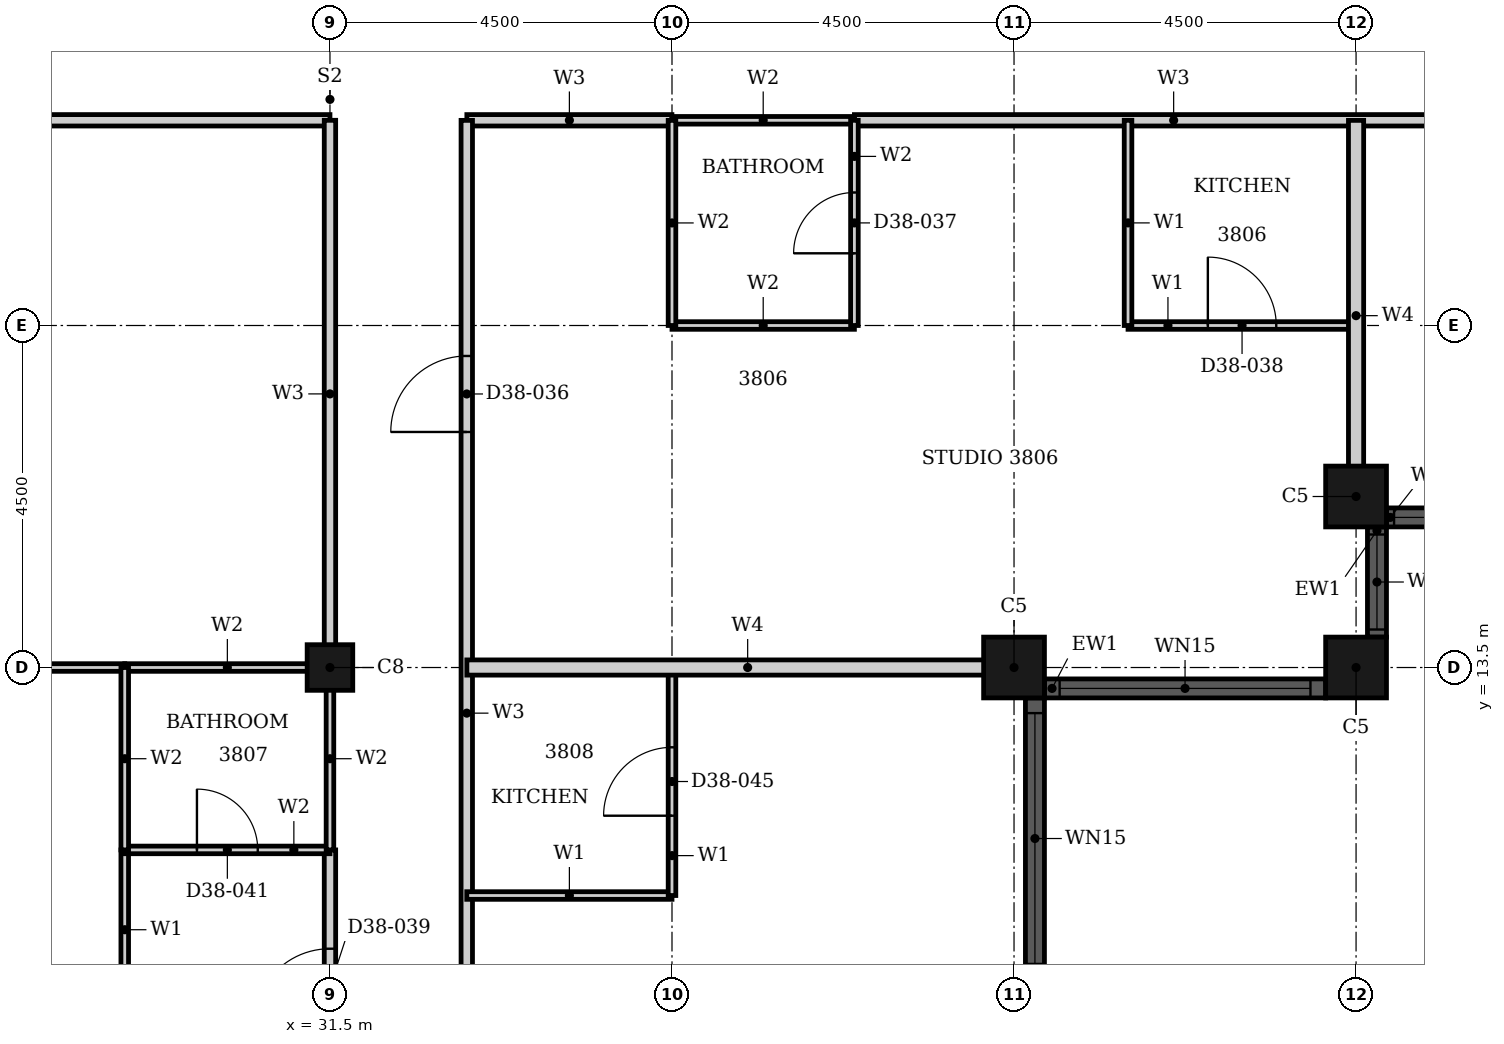
"""IFC4 building model, lengths in metres.
Left out: names, types, materials, properties, quantities, classifications, styles, units other than length and angle.
Written with IfcOpenShell. Run it as: python <this file> out.ifc"""

import sys

from ifc_helpers import new_model, si_unit, direction, frame, frame_2d, origin, origin_2d, place, context, subcontext, project, spatial, rectangle, hollow_rectangle, extrude, element, fill, save


model = new_model("IFC4")
c1 = context("Model", 3, precision=1e-05, world=origin(), true_north=direction((0.0, 1.0)))
c2 = subcontext(c1, "Body", "Model", "MODEL_VIEW")
j1 = project(units=[si_unit("LENGTHUNIT", "METRE"), si_unit("PLANEANGLEUNIT", "RADIAN")], contexts=[c1])
p1 = place(None, origin())
s1 = spatial("IfcSite", under=j1, at=p1, CompositionType="ELEMENT")
p2 = place(p1, origin())
s2 = spatial("IfcBuilding", under=s1, at=p2, CompositionType="ELEMENT")
p3 = place(p2, frame((0.0, 0.0, 154.3)))
s3 = spatial("IfcBuildingStorey", under=s2, at=p3, CompositionType="ELEMENT", Elevation=154.3)
for number, where, z_axis, x_axis in (
    (1, (40.5, 13.5, 0.0), (0.0, 0.0, 1.0), (1.0, 0.0, 0.0)),
    (2, (45.0, 13.5, 0.0), (0.0, 0.0, 1.0), (1.0, 0.0, 0.0)),
    (3, (45.0, 15.75, 0.0), (0.0, 0.0, 1.0), (1.0, 0.0, 0.0)),
):
    element("IfcColumn", number, at=place(p3, frame(where, z_axis=z_axis, x_axis=x_axis)), inside=s3, PredefinedType="COLUMN", context=c2, shape_type="SweptSolid", body=[
        extrude(hollow_rectangle(XDim=0.8, YDim=0.8, WallThickness=0.025, at=origin_2d()), origin(), (0.0, 0.0, 1.0), 3.7),
    ])
p4 = place(p3, frame((31.5, 13.5, 0.0), z_axis=(0.0, 0.0, 1.0), x_axis=(1.0, 0.0, 0.0)))
e4 = element("IfcColumn", 4, at=p4, inside=s3, PredefinedType="COLUMN", context=c2, shape_type="SweptSolid", body=[
    extrude(hollow_rectangle(XDim=0.6, YDim=0.6, WallThickness=0.02, at=origin_2d()), origin(), (0.0, 0.0, 1.0), 3.7),
])
p5 = place(p3, frame((40.775, 4.9, 0.0), z_axis=(0.0, 0.0, 1.0), x_axis=(0.0, 1.0, 0.0)))
e5 = element("IfcWall", 5, at=p5, inside=s3, PredefinedType="SOLIDWALL", context=c2, shape_type="SweptSolid", body=[
    extrude(rectangle(XDim=8.2, YDim=0.25, at=frame_2d((4.1, 0.0))), origin(), (0.0, 0.0, 1.0), 3.7),
])
p6 = place(p5, frame((0.2, 0.0, 0.45)))
e6 = element("IfcOpeningElement", 6, at=p6, cuts=e5, PredefinedType="OPENING", context=c2, shape_type="SweptSolid", body=[
    extrude(rectangle(XDim=3.3, YDim=2.3, at=frame_2d((1.65, 1.15))), frame((0.0, 0.135, 0.0), z_axis=(0.0, -1.0, 0.0), x_axis=(1.0, 0.0, 0.0)), (0.0, 0.0, 1.0), 0.27),
])
p7 = place(p5, frame((4.7, 0.0, 0.45)))
e7 = element("IfcOpeningElement", 7, at=p7, cuts=e5, PredefinedType="OPENING", context=c2, shape_type="SweptSolid", body=[
    extrude(rectangle(XDim=3.3, YDim=2.3, at=frame_2d((1.65, 1.15))), frame((0.0, 0.135, 0.0), z_axis=(0.0, -1.0, 0.0), x_axis=(1.0, 0.0, 0.0)), (0.0, 0.0, 1.0), 0.27),
])
p8 = place(p3, frame((40.9, 13.225, 0.0), z_axis=(0.0, 0.0, 1.0), x_axis=(1.0, 0.0, 0.0)))
e8 = element("IfcWall", 8, at=p8, inside=s3, PredefinedType="SOLIDWALL", context=c2, shape_type="SweptSolid", body=[
    extrude(rectangle(XDim=3.7, YDim=0.25, at=frame_2d((1.85, 0.0))), origin(), (0.0, 0.0, 1.0), 3.7),
])
p9 = place(p8, frame((0.2, 0.0, 0.45)))
e9 = element("IfcOpeningElement", 9, at=p9, cuts=e8, PredefinedType="OPENING", context=c2, shape_type="SweptSolid", body=[
    extrude(rectangle(XDim=3.3, YDim=2.3, at=frame_2d((1.65, 1.15))), frame((0.0, 0.135, 0.0), z_axis=(0.0, -1.0, 0.0), x_axis=(1.0, 0.0, 0.0)), (0.0, 0.0, 1.0), 0.27),
])
p10 = place(p3, frame((45.275, 13.9, 0.0), z_axis=(0.0, 0.0, 1.0), x_axis=(0.0, 1.0, 0.0)))
e10 = element("IfcWall", 10, at=p10, inside=s3, PredefinedType="SOLIDWALL", context=c2, shape_type="SweptSolid", body=[
    extrude(rectangle(XDim=1.45, YDim=0.25, at=frame_2d((0.725, 0.0))), origin(), (0.0, 0.0, 1.0), 3.7),
])
p11 = place(p10, frame((0.1, 0.0, 0.9)))
e11 = element("IfcOpeningElement", 11, at=p11, cuts=e10, PredefinedType="OPENING", context=c2, shape_type="SweptSolid", body=[
    extrude(rectangle(XDim=1.25, YDim=1.85, at=frame_2d((0.625, 0.925))), frame((0.0, 0.135, 0.0), z_axis=(0.0, -1.0, 0.0), x_axis=(1.0, 0.0, 0.0)), (0.0, 0.0, 1.0), 0.27),
])
p12 = place(p3, frame((45.4, 15.475, 0.0), z_axis=(0.0, 0.0, 1.0), x_axis=(1.0, 0.0, 0.0)))
e12 = element("IfcWall", 12, at=p12, inside=s3, PredefinedType="SOLIDWALL", context=c2, shape_type="SweptSolid", body=[
    extrude(rectangle(XDim=1.45, YDim=0.25, at=frame_2d((0.725, 0.0))), origin(), (0.0, 0.0, 1.0), 3.7),
])
p13 = place(p12, frame((0.1, 0.0, 0.9)))
e13 = element("IfcOpeningElement", 13, at=p13, cuts=e12, PredefinedType="OPENING", context=c2, shape_type="SweptSolid", body=[
    extrude(rectangle(XDim=1.25, YDim=1.85, at=frame_2d((0.625, 0.925))), frame((0.0, 0.135, 0.0), z_axis=(0.0, -1.0, 0.0), x_axis=(1.0, 0.0, 0.0)), (0.0, 0.0, 1.0), 0.27),
])
p14 = place(p3, frame((33.301, 20.7, 0.0), z_axis=(0.0, 0.0, 1.0), x_axis=(1.0, 0.0, 0.0)))
e14 = element("IfcWall", 14, at=p14, inside=s3, PredefinedType="PARTITIONING", context=c2, shape_type="SweptSolid", body=[
    extrude(rectangle(XDim=2.698, YDim=0.15, at=frame_2d((1.349, 0.0))), origin(), (0.0, 0.0, 1.0), 3.4),
])
p15 = place(p3, frame((38.4, 20.7, 0.0), z_axis=(0.0, 0.0, 1.0), x_axis=(1.0, 0.0, 0.0)))
e15 = element("IfcWall", 15, at=p15, inside=s3, PredefinedType="PARTITIONING", context=c2, shape_type="SweptSolid", body=[
    extrude(rectangle(XDim=8.4, YDim=0.15, at=frame_2d((4.2, 0.0))), origin(), (0.0, 0.0, 1.0), 3.4),
])
p16 = place(p3, frame((18.0, 20.7, 0.0), z_axis=(0.0, 0.0, 1.0), x_axis=(1.0, 0.0, 0.0)))
e16 = element("IfcWall", 16, at=p16, inside=s3, PredefinedType="PARTITIONING", context=c2, shape_type="SweptSolid", body=[
    extrude(rectangle(XDim=13.5, YDim=0.15, at=frame_2d((6.75, 0.0))), origin(), (0.0, 0.0, 1.0), 3.4),
])
p17 = place(p16, frame((6.25, 0.0, 0.0)))
e17 = element("IfcOpeningElement", 17, at=p17, cuts=e16, PredefinedType="OPENING", context=c2, shape_type="SweptSolid", body=[
    extrude(rectangle(XDim=1.0, YDim=2.1, at=frame_2d((0.5, 1.05))), frame((0.0, 0.085, 0.0), z_axis=(0.0, -1.0, 0.0), x_axis=(1.0, 0.0, 0.0)), (0.0, 0.0, 1.0), 0.17),
])
p18 = place(p3, frame((31.5, 4.5, 0.0), z_axis=(0.0, 0.0, 1.0), x_axis=(0.0, 1.0, 0.0)))
e18 = element("IfcWall", 18, at=p18, inside=s3, PredefinedType="PARTITIONING", context=c2, shape_type="SweptSolid", body=[
    extrude(rectangle(XDim=6.6, YDim=0.15, at=frame_2d((3.3, 0.0))), origin(), (0.0, 0.0, 1.0), 2.68),
])
p19 = place(p18, frame((4.3, 0.0, 0.0)))
e19 = element("IfcOpeningElement", 19, at=p19, cuts=e18, PredefinedType="OPENING", context=c2, shape_type="SweptSolid", body=[
    extrude(rectangle(XDim=1.0, YDim=2.2, at=frame_2d((0.5, 1.1))), frame((0.0, 0.085, 0.0), z_axis=(0.0, -1.0, 0.0), x_axis=(1.0, 0.0, 0.0)), (0.0, 0.0, 1.0), 0.17),
])
p20 = place(p3, frame((31.5, 13.5, 0.0), z_axis=(0.0, 0.0, 1.0), x_axis=(0.0, 1.0, 0.0)))
e20 = element("IfcWall", 20, at=p20, inside=s3, PredefinedType="PARTITIONING", context=c2, shape_type="SweptSolid", body=[
    extrude(rectangle(XDim=7.2, YDim=0.15, at=frame_2d((3.6, 0.0))), origin(), (0.0, 0.0, 1.0), 3.4),
])
p21 = place(p3, frame((33.3, 6.9, 0.0), z_axis=(0.0, 0.0, 1.0), x_axis=(0.0, 1.0, 0.0)))
e21 = element("IfcWall", 21, at=p21, inside=s3, PredefinedType="PARTITIONING", context=c2, shape_type="SweptSolid", body=[
    extrude(rectangle(XDim=13.799, YDim=0.15, at=frame_2d((6.899, 0.0))), origin(), (0.0, 0.0, 1.0), 3.4),
])
p22 = place(p21, frame((9.699, 0.0, 0.0)))
e22 = element("IfcOpeningElement", 22, at=p22, cuts=e21, PredefinedType="OPENING", context=c2, shape_type="SweptSolid", body=[
    extrude(rectangle(XDim=1.0, YDim=2.2, at=frame_2d((0.5, 1.1))), frame((0.0, 0.085, 0.0), z_axis=(0.0, -1.0, 0.0), x_axis=(1.0, 0.0, 0.0)), (0.0, 0.0, 1.0), 0.17),
])
p23 = place(p21, frame((1.3, 0.0, 0.0)))
e23 = element("IfcOpeningElement", 23, at=p23, cuts=e21, PredefinedType="OPENING", context=c2, shape_type="SweptSolid", body=[
    extrude(rectangle(XDim=1.0, YDim=2.2, at=frame_2d((0.5, 1.1))), frame((0.0, 0.085, 0.0), z_axis=(0.0, -1.0, 0.0), x_axis=(1.0, 0.0, 0.0)), (0.0, 0.0, 1.0), 0.17),
])
p24 = place(p3, frame((33.3, 10.5, 0.0), z_axis=(0.0, 0.0, 1.0), x_axis=(1.0, 0.0, 0.0)))
e24 = element("IfcWall", 24, at=p24, inside=s3, PredefinedType="PARTITIONING", context=c2, shape_type="SweptSolid", body=[
    extrude(rectangle(XDim=2.7, YDim=0.1, at=frame_2d((1.35, 0.0))), origin(), (0.0, 0.0, 1.0), 3.4),
])
p25 = place(p3, frame((22.31, 13.5, 0.0), z_axis=(0.0, 0.0, 1.0), x_axis=(1.0, 0.0, 0.0)))
e25 = element("IfcWall", 25, at=p25, inside=s3, PredefinedType="PARTITIONING", context=c2, shape_type="SweptSolid", body=[
    extrude(rectangle(XDim=6.49, YDim=0.1, at=frame_2d((3.245, 0.0))), origin(), (0.0, 0.0, 1.0), 2.48),
])
p26 = place(p3, frame((42.0, 18.0, 0.0), z_axis=(0.0, 0.0, 1.0), x_axis=(1.0, 0.0, 0.0)))
e26 = element("IfcWall", 26, at=p26, inside=s3, PredefinedType="PARTITIONING", context=c2, shape_type="SweptSolid", body=[
    extrude(rectangle(XDim=3.0, YDim=0.1, at=frame_2d((1.5, 0.0))), origin(), (0.0, 0.0, 1.0), 3.4),
])
p27 = place(p26, frame((1.05, 0.0, 0.0)))
e27 = element("IfcOpeningElement", 27, at=p27, cuts=e26, PredefinedType="OPENING", context=c2, shape_type="SweptSolid", body=[
    extrude(rectangle(XDim=0.9, YDim=2.1, at=frame_2d((0.45, 1.05))), frame((0.0, 0.06, 0.0), z_axis=(0.0, -1.0, 0.0), x_axis=(1.0, 0.0, 0.0)), (0.0, 0.0, 1.0), 0.12),
])
p28 = place(p3, frame((28.8, 9.0, 0.0), z_axis=(0.0, 0.0, 1.0), x_axis=(0.0, 1.0, 0.0)))
e28 = element("IfcWall", 28, at=p28, inside=s3, PredefinedType="PARTITIONING", context=c2, shape_type="SweptSolid", body=[
    extrude(rectangle(XDim=2.1, YDim=0.1, at=frame_2d((1.05, 0.0))), origin(), (0.0, 0.0, 1.0), 3.4),
])
p29 = place(p3, frame((36.0, 10.5, 0.0), z_axis=(0.0, 0.0, 1.0), x_axis=(0.0, 1.0, 0.0)))
e29 = element("IfcWall", 29, at=p29, inside=s3, PredefinedType="PARTITIONING", context=c2, shape_type="SweptSolid", body=[
    extrude(rectangle(XDim=3.0, YDim=0.1, at=frame_2d((1.5, 0.0))), origin(), (0.0, 0.0, 1.0), 2.68),
])
p30 = place(p29, frame((1.05, 0.0, 0.0)))
e30 = element("IfcOpeningElement", 30, at=p30, cuts=e29, PredefinedType="OPENING", context=c2, shape_type="SweptSolid", body=[
    extrude(rectangle(XDim=0.9, YDim=2.1, at=frame_2d((0.45, 1.05))), frame((0.0, 0.06, 0.0), z_axis=(0.0, -1.0, 0.0), x_axis=(1.0, 0.0, 0.0)), (0.0, 0.0, 1.0), 0.12),
])
p31 = place(p3, frame((42.0, 18.0, 0.0), z_axis=(0.0, 0.0, 1.0), x_axis=(0.0, 1.0, 0.0)))
e31 = element("IfcWall", 31, at=p31, inside=s3, PredefinedType="PARTITIONING", context=c2, shape_type="SweptSolid", body=[
    extrude(rectangle(XDim=2.7, YDim=0.1, at=frame_2d((1.35, 0.0))), origin(), (0.0, 0.0, 1.0), 3.4),
])
p32 = place(p3, frame((33.301, 13.5, 0.0), z_axis=(0.0, 0.0, 1.0), x_axis=(1.0, 0.0, 0.0)))
e32 = element("IfcWall", 32, at=p32, inside=s3, PredefinedType="PARTITIONING", context=c2, shape_type="SweptSolid", body=[
    extrude(rectangle(XDim=7.389, YDim=0.2, at=frame_2d((3.694, 0.0))), origin(), (0.0, 0.0, 1.0), 2.48),
])
p33 = place(p3, frame((45.0, 15.56, 0.0), z_axis=(0.0, 0.0, 1.0), x_axis=(0.0, 1.0, 0.0)))
e33 = element("IfcWall", 33, at=p33, inside=s3, PredefinedType="PARTITIONING", context=c2, shape_type="SweptSolid", body=[
    extrude(rectangle(XDim=5.139, YDim=0.2, at=frame_2d((2.569, 0.0))), origin(), (0.0, 0.0, 1.0), 3.4),
])
p34 = place(p3, frame((28.8, 11.1, 0.0), z_axis=(0.0, 0.0, 1.0), x_axis=(1.0, 0.0, 0.0)))
e34 = element("IfcWall", 34, at=p34, inside=s3, PredefinedType="PARTITIONING", context=c2, shape_type="SweptSolid", body=[
    extrude(rectangle(XDim=2.7, YDim=0.1, at=frame_2d((1.35, 0.0))), origin(), (0.0, 0.0, 1.0), 3.4),
])
p35 = place(p34, frame((0.95, 0.0, 0.0)))
e35 = element("IfcOpeningElement", 35, at=p35, cuts=e34, PredefinedType="OPENING", context=c2, shape_type="SweptSolid", body=[
    extrude(rectangle(XDim=0.8, YDim=2.1, at=frame_2d((0.4, 1.05))), frame((0.0, 0.06, 0.0), z_axis=(0.0, -1.0, 0.0), x_axis=(1.0, 0.0, 0.0)), (0.0, 0.0, 1.0), 0.12),
])
p36 = place(p3, frame((28.8, 13.5, 0.0), z_axis=(0.0, 0.0, 1.0), x_axis=(1.0, 0.0, 0.0)))
e36 = element("IfcWall", 36, at=p36, inside=s3, PredefinedType="PARTITIONING", context=c2, shape_type="SweptSolid", body=[
    extrude(rectangle(XDim=2.7, YDim=0.1, at=frame_2d((1.35, 0.0))), origin(), (0.0, 0.0, 1.0), 2.48),
])
for number, where, z_axis, x_axis in (
    (37, (36.0, 18.0, 0.0), (0.0, 0.0, 1.0), (1.0, 0.0, 0.0)),
    (38, (36.0, 20.7, 0.0), (0.0, 0.0, 1.0), (1.0, 0.0, 0.0)),
    (39, (28.8, 11.1, 0.0), (0.0, 0.0, 1.0), (0.0, 1.0, 0.0)),
):
    element("IfcWall", number, at=place(p3, frame(where, z_axis=z_axis, x_axis=x_axis)), inside=s3, PredefinedType="PARTITIONING", context=c2, shape_type="SweptSolid", body=[
        extrude(rectangle(XDim=2.4, YDim=0.1, at=frame_2d((1.2, 0.0))), origin(), (0.0, 0.0, 1.0), 3.4),
    ])
p37 = place(p3, frame((31.5, 11.1, 0.0), z_axis=(0.0, 0.0, 1.0), x_axis=(0.0, 1.0, 0.0)))
e40 = element("IfcWall", 40, at=p37, inside=s3, PredefinedType="PARTITIONING", context=c2, shape_type="SweptSolid", body=[
    extrude(rectangle(XDim=2.4, YDim=0.1, at=frame_2d((1.2, 0.0))), origin(), (0.0, 0.0, 1.0), 2.68),
])
p38 = place(p3, frame((36.0, 18.0, 0.0), z_axis=(0.0, 0.0, 1.0), x_axis=(0.0, 1.0, 0.0)))
e41 = element("IfcWall", 41, at=p38, inside=s3, PredefinedType="PARTITIONING", context=c2, shape_type="SweptSolid", body=[
    extrude(rectangle(XDim=2.699, YDim=0.1, at=frame_2d((1.35, 0.0))), origin(), (0.0, 0.0, 1.0), 3.4),
])
p39 = place(p3, frame((38.4, 18.0, 0.0), z_axis=(0.0, 0.0, 1.0), x_axis=(0.0, 1.0, 0.0)))
e42 = element("IfcWall", 42, at=p39, inside=s3, PredefinedType="PARTITIONING", context=c2, shape_type="SweptSolid", body=[
    extrude(rectangle(XDim=2.7, YDim=0.1, at=frame_2d((1.35, 0.0))), origin(), (0.0, 0.0, 1.0), 3.4),
])
p40 = place(p39, frame((0.95, 0.0, 0.0)))
e43 = element("IfcOpeningElement", 43, at=p40, cuts=e42, PredefinedType="OPENING", context=c2, shape_type="SweptSolid", body=[
    extrude(rectangle(XDim=0.8, YDim=2.1, at=frame_2d((0.4, 1.05))), frame((0.0, 0.06, 0.0), z_axis=(0.0, -1.0, 0.0), x_axis=(1.0, 0.0, 0.0)), (0.0, 0.0, 1.0), 0.12),
])
p41 = place(p7, origin())
e44 = element("IfcWindow", 44, at=p41, inside=s3, PartitioningType="SINGLE_PANEL", PredefinedType="WINDOW", context=c2, shape_type="SweptSolid", body=[
    extrude(rectangle(XDim=3.3, YDim=2.3, at=frame_2d((1.65, 1.15))), frame((0.0, 0.03, 0.0), z_axis=(0.0, -1.0, 0.0), x_axis=(1.0, 0.0, 0.0)), (0.0, 0.0, 1.0), 0.06),
])
fill(e7, e44)
p42 = place(p9, origin())
e45 = element("IfcWindow", 45, at=p42, inside=s3, PartitioningType="SINGLE_PANEL", PredefinedType="WINDOW", context=c2, shape_type="SweptSolid", body=[
    extrude(rectangle(XDim=3.3, YDim=2.3, at=frame_2d((1.65, 1.15))), frame((0.0, 0.03, 0.0), z_axis=(0.0, -1.0, 0.0), x_axis=(1.0, 0.0, 0.0)), (0.0, 0.0, 1.0), 0.06),
])
fill(e9, e45)
p43 = place(p11, origin())
e46 = element("IfcWindow", 46, at=p43, inside=s3, PartitioningType="SINGLE_PANEL", PredefinedType="WINDOW", context=c2, shape_type="SweptSolid", body=[
    extrude(rectangle(XDim=1.25, YDim=1.85, at=frame_2d((0.625, 0.925))), frame((0.0, 0.03, 0.0), z_axis=(0.0, -1.0, 0.0), x_axis=(1.0, 0.0, 0.0)), (0.0, 0.0, 1.0), 0.06),
])
fill(e11, e46)
p44 = place(p13, origin())
e47 = element("IfcWindow", 47, at=p44, inside=s3, PartitioningType="SINGLE_PANEL", PredefinedType="WINDOW", context=c2, shape_type="SweptSolid", body=[
    extrude(rectangle(XDim=1.25, YDim=1.85, at=frame_2d((0.625, 0.925))), frame((0.0, 0.03, 0.0), z_axis=(0.0, -1.0, 0.0), x_axis=(1.0, 0.0, 0.0)), (0.0, 0.0, 1.0), 0.06),
])
fill(e13, e47)
p45 = place(p22, origin())
e48 = element("IfcDoor", 48, at=p45, inside=s3, OperationType="SINGLE_SWING_LEFT", PredefinedType="DOOR", context=c2, shape_type="SweptSolid", body=[
    extrude(rectangle(XDim=1.0, YDim=2.2, at=frame_2d((0.5, 1.1))), frame((0.0, 0.025, 0.0), z_axis=(0.0, -1.0, 0.0), x_axis=(1.0, 0.0, 0.0)), (0.0, 0.0, 1.0), 0.05),
])
fill(e22, e48)
p46 = place(p40, origin())
e49 = element("IfcDoor", 49, at=p46, inside=s3, OperationType="SINGLE_SWING_LEFT", PredefinedType="DOOR", context=c2, shape_type="SweptSolid", body=[
    extrude(rectangle(XDim=0.8, YDim=2.1, at=frame_2d((0.4, 1.05))), frame((0.0, 0.025, 0.0), z_axis=(0.0, -1.0, 0.0), x_axis=(1.0, 0.0, 0.0)), (0.0, 0.0, 1.0), 0.05),
])
fill(e43, e49)
p47 = place(p27, origin())
e50 = element("IfcDoor", 50, at=p47, inside=s3, OperationType="SINGLE_SWING_LEFT", PredefinedType="DOOR", context=c2, shape_type="SweptSolid", body=[
    extrude(rectangle(XDim=0.9, YDim=2.1, at=frame_2d((0.45, 1.05))), frame((0.0, 0.025, 0.0), z_axis=(0.0, -1.0, 0.0), x_axis=(1.0, 0.0, 0.0)), (0.0, 0.0, 1.0), 0.05),
])
fill(e27, e50)
p48 = place(p19, origin())
e51 = element("IfcDoor", 51, at=p48, inside=s3, OperationType="SINGLE_SWING_RIGHT", PredefinedType="DOOR", context=c2, shape_type="SweptSolid", body=[
    extrude(rectangle(XDim=1.0, YDim=2.2, at=frame_2d((0.5, 1.1))), frame((0.0, 0.025, 0.0), z_axis=(0.0, -1.0, 0.0), x_axis=(1.0, 0.0, 0.0)), (0.0, 0.0, 1.0), 0.05),
])
fill(e19, e51)
p49 = place(p35, origin())
e52 = element("IfcDoor", 52, at=p49, inside=s3, OperationType="SINGLE_SWING_RIGHT", PredefinedType="DOOR", context=c2, shape_type="SweptSolid", body=[
    extrude(rectangle(XDim=0.8, YDim=2.1, at=frame_2d((0.4, 1.05))), frame((0.0, 0.025, 0.0), z_axis=(0.0, -1.0, 0.0), x_axis=(1.0, 0.0, 0.0)), (0.0, 0.0, 1.0), 0.05),
])
fill(e35, e52)
p50 = place(p30, origin())
e53 = element("IfcDoor", 53, at=p50, inside=s3, OperationType="SINGLE_SWING_LEFT", PredefinedType="DOOR", context=c2, shape_type="SweptSolid", body=[
    extrude(rectangle(XDim=0.9, YDim=2.1, at=frame_2d((0.45, 1.05))), frame((0.0, 0.025, 0.0), z_axis=(0.0, -1.0, 0.0), x_axis=(1.0, 0.0, 0.0)), (0.0, 0.0, 1.0), 0.05),
])
fill(e30, e53)
save(model, sys.argv[1])
